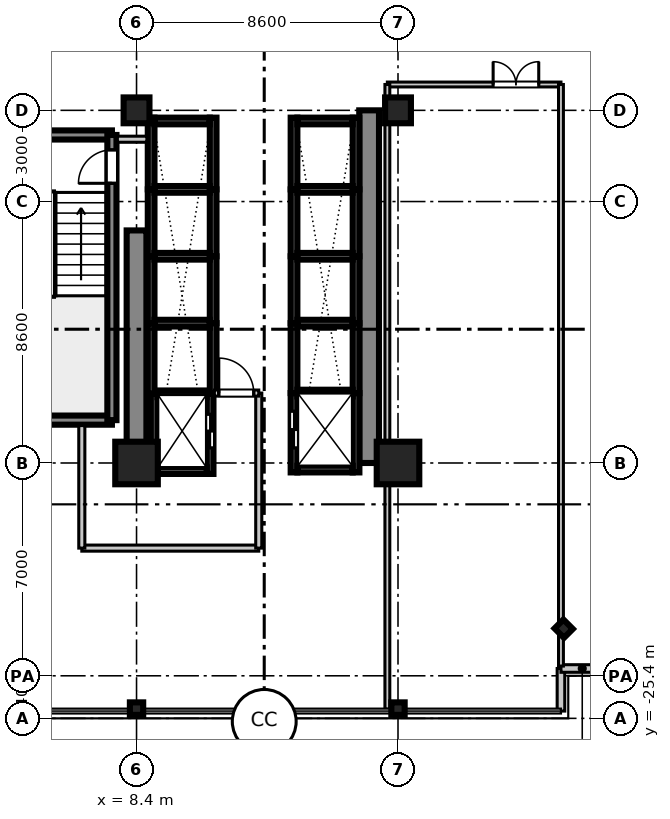
"""IFC4 building model, lengths in metres.
Left out: names, types, materials, properties, quantities, classifications, styles, units other than length and angle.
Written with IfcOpenShell. Run it as: python <this file> out.ifc"""

import sys

from ifc_helpers import new_model, si_unit, direction, frame, frame_2d, origin, origin_2d, place, context, subcontext, project, spatial, rectangle, i_section, extrude, source, transform, mapped, element, fill, save


model = new_model("IFC4")
c1 = context("Model", 3, precision=1e-05, world=origin(), true_north=direction((0.0, 1.0)))
c2 = subcontext(c1, "Body", "Model", "MODEL_VIEW")
j1 = project(units=[si_unit("LENGTHUNIT", "METRE"), si_unit("PLANEANGLEUNIT", "RADIAN")], contexts=[c1])
p1 = place(None, origin())
s1 = spatial("IfcSite", under=j1, at=p1, CompositionType="ELEMENT")
p2 = place(p1, origin())
s2 = spatial("IfcBuilding", under=s1, at=p2, CompositionType="ELEMENT")
p3 = place(p2, frame((0.0, 0.0, 47.0)))
s3 = spatial("IfcBuildingStorey", under=s2, at=p3, CompositionType="ELEMENT", Elevation=47.0)
m1 = source(origin(), c2, "Body", "SweptSolid", [
    extrude(rectangle(XDim=1.4, YDim=1.4, at=origin_2d()), origin(), (0.0, 0.0, 1.0), 3.605),
])
p4 = place(p3, frame((8.4, -17.0, 0.0), z_axis=(0.0, 0.0, 1.0), x_axis=(1.0, 0.0, 0.0)))
e1 = element("IfcColumn", 1, at=p4, inside=s3, PredefinedType="COLUMN", context=c2, shape_type="MappedRepresentation", body=[
    mapped(m1, transform((0.0, 0.0, 0.0), scale=1.0)),
])
m2 = source(origin(), c2, "Body", "SweptSolid", [
    extrude(rectangle(XDim=0.85, YDim=0.85, at=origin_2d()), origin(), (0.0, 0.0, 1.0), 3.605),
])
p5 = place(p3, frame((8.4, -5.4, 0.0), z_axis=(0.0, 0.0, 1.0), x_axis=(1.0, 0.0, 0.0)))
e2 = element("IfcColumn", 2, at=p5, inside=s3, PredefinedType="PILASTER", context=c2, shape_type="MappedRepresentation", body=[
    mapped(m2, transform((0.0, 0.0, 0.0), scale=1.0)),
])
p6 = place(p3, frame((17.0, -17.0, 0.0), z_axis=(0.0, 0.0, 1.0), x_axis=(1.0, 0.0, 0.0)))
e3 = element("IfcColumn", 3, at=p6, inside=s3, PredefinedType="COLUMN", context=c2, shape_type="MappedRepresentation", body=[
    mapped(m1, transform((0.0, 0.0, 0.0), scale=1.0)),
])
p7 = place(p3, frame((17.0, -5.4, 0.0), z_axis=(0.0, 0.0, 1.0), x_axis=(1.0, 0.0, 0.0)))
e4 = element("IfcColumn", 4, at=p7, inside=s3, PredefinedType="PILASTER", context=c2, shape_type="MappedRepresentation", body=[
    mapped(m2, transform((0.0, 0.0, 0.0), scale=1.0)),
])
m3 = source(origin(), c2, "Body", "SweptSolid", [
    extrude(i_section(OverallWidth=0.412, OverallDepth=0.438, WebThickness=0.023, FlangeThickness=0.036, at=origin_2d()), origin(), (0.0, 0.0, 1.0), 3.605),
])
for number, where, z_axis, x_axis in (
    (5, (8.4, -25.08, 0.0), (0.0, 0.0, 1.0), (0.0, 1.0, 0.0)),
    (6, (17.0, -25.08, 0.0), (0.0, 0.0, 1.0), (0.0, 1.0, 0.0)),
    (7, (22.45, -22.45, 0.0), (0.0, 0.0, 1.0), (0.707, 0.707, 0.0)),
):
    element("IfcColumn", number, at=place(p3, frame(where, z_axis=z_axis, x_axis=x_axis)), inside=s3, PredefinedType="COLUMN", context=c2, shape_type="MappedRepresentation", body=[
        mapped(m3, transform((0.0, 0.0, 0.0), scale=1.0)),
    ])
m4 = source(origin(), c2, "Body", "SweptSolid", [
    extrude(rectangle(XDim=7.65, YDim=0.65, at=frame_2d((3.825, 0.0))), origin(), (0.0, 0.0, 1.0), 3.37),
])
p8 = place(p3, frame((8.4, -17.0, 0.0), z_axis=(0.0, 0.0, 1.0), x_axis=(0.0, 1.0, 0.0)))
e8 = element("IfcWall", 8, at=p8, inside=s3, PredefinedType="SHEAR", context=c2, shape_type="MappedRepresentation", body=[
    mapped(m4, transform((0.0, 0.0, 0.0), scale=1.0)),
])
m5 = source(origin(), c2, "Body", "SweptSolid", [
    extrude(rectangle(XDim=11.6, YDim=0.65, at=frame_2d((5.8, 0.0))), origin(), (0.0, 0.0, 1.0), 3.37),
])
p9 = place(p3, frame((16.05, -17.0, 0.0), z_axis=(0.0, 0.0, 1.0), x_axis=(0.0, 1.0, 0.0)))
e9 = element("IfcWall", 9, at=p9, inside=s3, PredefinedType="SHEAR", context=c2, shape_type="MappedRepresentation", body=[
    mapped(m5, transform((0.0, 0.0, 0.0), scale=1.0)),
])
m6 = source(origin(), c2, "Body", "SweptSolid", [
    extrude(rectangle(XDim=3.98, YDim=0.3, at=frame_2d((1.99, 0.0))), origin(), (0.0, 0.0, 1.0), 3.37),
])
for number, where, z_axis, x_axis in (
    (10, (3.61, -15.59, 0.0), (0.0, 0.0, 1.0), (1.0, 0.0, 0.0)),
    (11, (3.61, -6.21, 0.0), (0.0, 0.0, 1.0), (1.0, 0.0, 0.0)),
):
    element("IfcWall", number, at=place(p3, frame(where, z_axis=z_axis, x_axis=x_axis)), inside=s3, PredefinedType="SHEAR", context=c2, shape_type="MappedRepresentation", body=[
        mapped(m6, transform((0.0, 0.0, 0.0), scale=1.0)),
    ])
m7 = source(origin(), c2, "Body", "SweptSolid", [
    extrude(rectangle(XDim=9.38, YDim=0.3, at=frame_2d((4.69, 0.0))), origin(), (0.0, 0.0, 1.0), 3.37),
])
p10 = place(p3, frame((7.59, -15.59, 0.0), z_axis=(0.0, 0.0, 1.0), x_axis=(0.0, 1.0, 0.0)))
e12 = element("IfcWall", 12, at=p10, inside=s3, PredefinedType="SHEAR", context=c2, shape_type="MappedRepresentation", body=[
    mapped(m7, transform((0.0, 0.0, 0.0), scale=1.0)),
])
p11 = place(p10, frame((7.79, 0.0, 0.0)))
e13 = element("IfcOpeningElement", 13, at=p11, cuts=e12, PredefinedType="OPENING", context=c2, shape_type="SweptSolid", body=[
    extrude(rectangle(XDim=1.1, YDim=2.15, at=frame_2d((0.55, 1.075))), frame((0.0, 0.16, 0.0), z_axis=(0.0, -1.0, 0.0), x_axis=(1.0, 0.0, 0.0)), (0.0, 0.0, 1.0), 0.32),
])
m8 = source(origin(), c2, "Body", "SweptSolid", [
    extrude(rectangle(XDim=2.36, YDim=0.22, at=frame_2d((1.18, 0.0))), origin(), (0.0, 0.0, 1.0), 3.37),
])
for number, where, z_axis, x_axis in (
    (14, (13.58, -8.0, 0.0), (0.0, 0.0, 1.0), (0.0, 1.0, 0.0)),
    (15, (15.62, -8.0, 0.0), (0.0, 0.0, 1.0), (0.0, 1.0, 0.0)),
):
    element("IfcWall", number, at=place(p3, frame(where, z_axis=z_axis, x_axis=x_axis)), inside=s3, PredefinedType="SHEAR", context=c2, shape_type="MappedRepresentation", body=[
        mapped(m8, transform((0.0, 0.0, 0.0), scale=1.0)),
    ])
m9 = source(origin(), c2, "Body", "SweptSolid", [
    extrude(rectangle(XDim=1.82, YDim=0.22, at=frame_2d((0.91, 0.0))), origin(), (0.0, 0.0, 1.0), 3.37),
])
p12 = place(p3, frame((13.69, -5.75, 0.0), z_axis=(0.0, 0.0, 1.0), x_axis=(1.0, 0.0, 0.0)))
e16 = element("IfcWall", 16, at=p12, inside=s3, PredefinedType="SHEAR", context=c2, shape_type="MappedRepresentation", body=[
    mapped(m9, transform((0.0, 0.0, 0.0), scale=1.0)),
])
m10 = source(origin(), c2, "Body", "SweptSolid", [
    extrude(rectangle(XDim=2.2, YDim=0.22, at=frame_2d((1.1, 0.0))), origin(), (0.0, 0.0, 1.0), 3.37),
])
for number, where, z_axis, x_axis in (
    (17, (13.58, -10.2, 0.0), (0.0, 0.0, 1.0), (0.0, 1.0, 0.0)),
    (18, (15.62, -10.2, 0.0), (0.0, 0.0, 1.0), (0.0, 1.0, 0.0)),
):
    element("IfcWall", number, at=place(p3, frame(where, z_axis=z_axis, x_axis=x_axis)), inside=s3, PredefinedType="SHEAR", context=c2, shape_type="MappedRepresentation", body=[
        mapped(m10, transform((0.0, 0.0, 0.0), scale=1.0)),
    ])
m11 = source(origin(), c2, "Body", "SweptSolid", [
    extrude(rectangle(XDim=1.82, YDim=0.22, at=frame_2d((0.91, 0.0))), origin(), (0.0, 0.0, 1.0), 3.65),
])
p13 = place(p3, frame((13.69, -8.0, 0.0), z_axis=(0.0, 0.0, 1.0), x_axis=(1.0, 0.0, 0.0)))
e19 = element("IfcWall", 19, at=p13, inside=s3, PredefinedType="SHEAR", context=c2, shape_type="MappedRepresentation", body=[
    mapped(m11, transform((0.0, 0.0, 0.0), scale=1.0)),
])
for number, where, z_axis, x_axis in (
    (20, (13.58, -12.4, 0.0), (0.0, 0.0, 1.0), (0.0, 1.0, 0.0)),
    (21, (15.62, -12.4, 0.0), (0.0, 0.0, 1.0), (0.0, 1.0, 0.0)),
):
    element("IfcWall", number, at=place(p3, frame(where, z_axis=z_axis, x_axis=x_axis)), inside=s3, PredefinedType="SHEAR", context=c2, shape_type="MappedRepresentation", body=[
        mapped(m10, transform((0.0, 0.0, 0.0), scale=1.0)),
    ])
p14 = place(p3, frame((13.69, -10.2, 0.0), z_axis=(0.0, 0.0, 1.0), x_axis=(1.0, 0.0, 0.0)))
e22 = element("IfcWall", 22, at=p14, inside=s3, PredefinedType="SHEAR", context=c2, shape_type="MappedRepresentation", body=[
    mapped(m11, transform((0.0, 0.0, 0.0), scale=1.0)),
])
m12 = source(origin(), c2, "Body", "SweptSolid", [
    extrude(rectangle(XDim=2.3, YDim=0.22, at=frame_2d((1.15, 0.0))), origin(), (0.0, 0.0, 1.0), 3.37),
])
for number, where, z_axis, x_axis in (
    (23, (13.58, -14.7, 0.0), (0.0, 0.0, 1.0), (0.0, 1.0, 0.0)),
    (24, (15.62, -14.7, 0.0), (0.0, 0.0, 1.0), (0.0, 1.0, 0.0)),
):
    element("IfcWall", number, at=place(p3, frame(where, z_axis=z_axis, x_axis=x_axis)), inside=s3, PredefinedType="SHEAR", context=c2, shape_type="MappedRepresentation", body=[
        mapped(m12, transform((0.0, 0.0, 0.0), scale=1.0)),
    ])
p15 = place(p3, frame((13.69, -12.4, 0.0), z_axis=(0.0, 0.0, 1.0), x_axis=(1.0, 0.0, 0.0)))
e25 = element("IfcWall", 25, at=p15, inside=s3, PredefinedType="SHEAR", context=c2, shape_type="MappedRepresentation", body=[
    mapped(m11, transform((0.0, 0.0, 0.0), scale=1.0)),
])
for number, where, z_axis, x_axis in (
    (26, (8.88, -8.0, 0.0), (0.0, 0.0, 1.0), (0.0, 1.0, 0.0)),
    (27, (10.92, -8.0, 0.0), (0.0, 0.0, 1.0), (0.0, 1.0, 0.0)),
):
    element("IfcWall", number, at=place(p3, frame(where, z_axis=z_axis, x_axis=x_axis)), inside=s3, PredefinedType="SHEAR", context=c2, shape_type="MappedRepresentation", body=[
        mapped(m8, transform((0.0, 0.0, 0.0), scale=1.0)),
    ])
p16 = place(p3, frame((8.99, -5.75, 0.0), z_axis=(0.0, 0.0, 1.0), x_axis=(1.0, 0.0, 0.0)))
e28 = element("IfcWall", 28, at=p16, inside=s3, PredefinedType="SHEAR", context=c2, shape_type="MappedRepresentation", body=[
    mapped(m9, transform((0.0, 0.0, 0.0), scale=1.0)),
])
for number, where, z_axis, x_axis in (
    (29, (8.88, -10.2, 0.0), (0.0, 0.0, 1.0), (0.0, 1.0, 0.0)),
    (30, (10.92, -10.2, 0.0), (0.0, 0.0, 1.0), (0.0, 1.0, 0.0)),
):
    element("IfcWall", number, at=place(p3, frame(where, z_axis=z_axis, x_axis=x_axis)), inside=s3, PredefinedType="SHEAR", context=c2, shape_type="MappedRepresentation", body=[
        mapped(m10, transform((0.0, 0.0, 0.0), scale=1.0)),
    ])
p17 = place(p3, frame((8.99, -8.0, 0.0), z_axis=(0.0, 0.0, 1.0), x_axis=(1.0, 0.0, 0.0)))
e31 = element("IfcWall", 31, at=p17, inside=s3, PredefinedType="SHEAR", context=c2, shape_type="MappedRepresentation", body=[
    mapped(m11, transform((0.0, 0.0, 0.0), scale=1.0)),
])
for number, where, z_axis, x_axis in (
    (32, (8.88, -12.4, 0.0), (0.0, 0.0, 1.0), (0.0, 1.0, 0.0)),
    (33, (10.92, -12.4, 0.0), (0.0, 0.0, 1.0), (0.0, 1.0, 0.0)),
):
    element("IfcWall", number, at=place(p3, frame(where, z_axis=z_axis, x_axis=x_axis)), inside=s3, PredefinedType="SHEAR", context=c2, shape_type="MappedRepresentation", body=[
        mapped(m10, transform((0.0, 0.0, 0.0), scale=1.0)),
    ])
p18 = place(p3, frame((8.99, -10.2, 0.0), z_axis=(0.0, 0.0, 1.0), x_axis=(1.0, 0.0, 0.0)))
e34 = element("IfcWall", 34, at=p18, inside=s3, PredefinedType="SHEAR", context=c2, shape_type="MappedRepresentation", body=[
    mapped(m11, transform((0.0, 0.0, 0.0), scale=1.0)),
])
m13 = source(origin(), c2, "Body", "SweptSolid", [
    extrude(rectangle(XDim=2.325, YDim=0.22, at=frame_2d((1.163, 0.0))), origin(), (0.0, 0.0, 1.0), 3.37),
])
for number, where, z_axis, x_axis in (
    (35, (8.88, -14.725, 0.0), (0.0, 0.0, 1.0), (0.0, 1.0, 0.0)),
    (36, (10.92, -14.725, 0.0), (0.0, 0.0, 1.0), (0.0, 1.0, 0.0)),
):
    element("IfcWall", number, at=place(p3, frame(where, z_axis=z_axis, x_axis=x_axis)), inside=s3, PredefinedType="SHEAR", context=c2, shape_type="MappedRepresentation", body=[
        mapped(m13, transform((0.0, 0.0, 0.0), scale=1.0)),
    ])
p19 = place(p3, frame((8.99, -12.4, 0.0), z_axis=(0.0, 0.0, 1.0), x_axis=(1.0, 0.0, 0.0)))
e37 = element("IfcWall", 37, at=p19, inside=s3, PredefinedType="SHEAR", context=c2, shape_type="MappedRepresentation", body=[
    mapped(m11, transform((0.0, 0.0, 0.0), scale=1.0)),
])
m14 = source(origin(), c2, "Body", "SweptSolid", [
    extrude(rectangle(XDim=2.635, YDim=0.22, at=frame_2d((1.317, 0.0))), origin(), (0.0, 0.0, 1.0), 3.37),
])
p20 = place(p3, frame((8.98, -17.36, 0.0), z_axis=(0.0, 0.0, 1.0), x_axis=(0.0, 1.0, 0.0)))
e38 = element("IfcWall", 38, at=p20, inside=s3, PredefinedType="SHEAR", context=c2, shape_type="MappedRepresentation", body=[
    mapped(m14, transform((0.0, 0.0, 0.0), scale=1.0)),
])
p21 = place(p3, frame((10.82, -17.36, 0.0), z_axis=(0.0, 0.0, 1.0), x_axis=(0.0, 1.0, 0.0)))
e39 = element("IfcWall", 39, at=p21, inside=s3, PredefinedType="SHEAR", context=c2, shape_type="MappedRepresentation", body=[
    mapped(m14, transform((0.0, 0.0, 0.0), scale=1.0)),
])
p22 = place(p21, frame((0.86, 0.0, 0.0)))
e40 = element("IfcOpeningElement", 40, at=p22, cuts=e39, PredefinedType="OPENING", context=c2, shape_type="SweptSolid", body=[
    extrude(rectangle(XDim=1.1, YDim=2.2, at=frame_2d((0.55, 1.1))), frame((0.0, 0.12, 0.0), z_axis=(0.0, -1.0, 0.0), x_axis=(1.0, 0.0, 0.0)), (0.0, 0.0, 1.0), 0.24),
])
m15 = source(origin(), c2, "Body", "SweptSolid", [
    extrude(rectangle(XDim=1.62, YDim=0.22, at=frame_2d((0.81, 0.0))), origin(), (0.0, 0.0, 1.0), 3.37),
])
p23 = place(p3, frame((9.09, -17.25, 0.0), z_axis=(0.0, 0.0, 1.0), x_axis=(1.0, 0.0, 0.0)))
e41 = element("IfcWall", 41, at=p23, inside=s3, PredefinedType="SHEAR", context=c2, shape_type="MappedRepresentation", body=[
    mapped(m15, transform((0.0, 0.0, 0.0), scale=1.0)),
])
m16 = source(origin(), c2, "Body", "SweptSolid", [
    extrude(rectangle(XDim=1.62, YDim=0.22, at=frame_2d((0.81, 0.0))), origin(), (0.0, 0.0, 1.0), 3.65),
])
p24 = place(p3, frame((9.09, -14.725, 0.0), z_axis=(0.0, 0.0, 1.0), x_axis=(1.0, 0.0, 0.0)))
e42 = element("IfcWall", 42, at=p24, inside=s3, PredefinedType="SHEAR", context=c2, shape_type="MappedRepresentation", body=[
    mapped(m16, transform((0.0, 0.0, 0.0), scale=1.0)),
])
m17 = source(origin(), c2, "Body", "SweptSolid", [
    extrude(rectangle(XDim=2.61, YDim=0.22, at=frame_2d((1.305, 0.0))), origin(), (0.0, 0.0, 1.0), 3.37),
])
p25 = place(p3, frame((13.58, -17.31, 0.0), z_axis=(0.0, 0.0, 1.0), x_axis=(0.0, 1.0, 0.0)))
e43 = element("IfcWall", 43, at=p25, inside=s3, PredefinedType="SHEAR", context=c2, shape_type="MappedRepresentation", body=[
    mapped(m17, transform((0.0, 0.0, 0.0), scale=1.0)),
])
p26 = place(p25, frame((0.81, 0.0, 0.0)))
e44 = element("IfcOpeningElement", 44, at=p26, cuts=e43, PredefinedType="OPENING", context=c2, shape_type="SweptSolid", body=[
    extrude(rectangle(XDim=1.2, YDim=2.2, at=frame_2d((0.6, 1.1))), frame((0.0, 0.12, 0.0), z_axis=(0.0, -1.0, 0.0), x_axis=(1.0, 0.0, 0.0)), (0.0, 0.0, 1.0), 0.24),
])
p27 = place(p3, frame((15.62, -17.31, 0.0), z_axis=(0.0, 0.0, 1.0), x_axis=(0.0, 1.0, 0.0)))
e45 = element("IfcWall", 45, at=p27, inside=s3, PredefinedType="SHEAR", context=c2, shape_type="MappedRepresentation", body=[
    mapped(m17, transform((0.0, 0.0, 0.0), scale=1.0)),
])
p28 = place(p3, frame((13.69, -17.2, 0.0), z_axis=(0.0, 0.0, 1.0), x_axis=(1.0, 0.0, 0.0)))
e46 = element("IfcWall", 46, at=p28, inside=s3, PredefinedType="SHEAR", context=c2, shape_type="MappedRepresentation", body=[
    mapped(m9, transform((0.0, 0.0, 0.0), scale=1.0)),
])
p29 = place(p3, frame((13.69, -14.7, 0.0), z_axis=(0.0, 0.0, 1.0), x_axis=(1.0, 0.0, 0.0)))
e47 = element("IfcWall", 47, at=p29, inside=s3, PredefinedType="SHEAR", context=c2, shape_type="MappedRepresentation", body=[
    mapped(m11, transform((0.0, 0.0, 0.0), scale=1.0)),
])
m18 = source(origin(), c2, "Body", "SweptSolid", [
    extrude(rectangle(XDim=1.4, YDim=0.25, at=frame_2d((0.7, 0.0))), origin(), (0.0, 0.0, 1.0), 3.37),
])
for number, where, z_axis, x_axis in (
    (48, (22.36, -25.16, 0.0), (0.0, 0.0, 1.0), (0.0, 1.0, 0.0)),
    (49, (22.36, -23.76, 0.0), (0.0, 0.0, 1.0), (1.0, 0.0, 0.0)),
):
    element("IfcWall", number, at=place(p3, frame(where, z_axis=z_axis, x_axis=x_axis)), inside=s3, PredefinedType="STANDARD", context=c2, shape_type="MappedRepresentation", body=[
        mapped(m18, transform((0.0, 0.0, 0.0), scale=1.0)),
    ])
m19 = source(origin(), c2, "Body", "SweptSolid", [
    extrude(rectangle(XDim=5.82, YDim=0.2, at=frame_2d((2.91, 0.0))), origin(), (0.0, 0.0, 1.0), 2.71),
])
p30 = place(p3, frame((6.6, -19.8, 0.0), z_axis=(0.0, 0.0, 1.0), x_axis=(1.0, 0.0, 0.0)))
e50 = element("IfcWall", 50, at=p30, inside=s3, PredefinedType="PARTITIONING", context=c2, shape_type="MappedRepresentation", body=[
    mapped(m19, transform((0.0, 0.0, 0.0), scale=1.0)),
])
m20 = source(origin(), c2, "Body", "SweptSolid", [
    extrude(rectangle(XDim=4.03, YDim=0.2, at=frame_2d((2.015, 0.0))), origin(), (0.0, 0.0, 1.0), 2.71),
])
p31 = place(p3, frame((6.6, -19.8, 0.0), z_axis=(0.0, 0.0, 1.0), x_axis=(0.0, 1.0, 0.0)))
e51 = element("IfcWall", 51, at=p31, inside=s3, PredefinedType="PARTITIONING", context=c2, shape_type="MappedRepresentation", body=[
    mapped(m20, transform((0.0, 0.0, 0.0), scale=1.0)),
])
m21 = source(origin(), c2, "Body", "SweptSolid", [
    extrude(rectangle(XDim=5.1, YDim=0.2, at=frame_2d((2.55, 0.0))), origin(), (0.0, 0.0, 1.0), 2.71),
])
p32 = place(p3, frame((12.42, -19.8, 0.0), z_axis=(0.0, 0.0, 1.0), x_axis=(0.0, 1.0, 0.0)))
e52 = element("IfcWall", 52, at=p32, inside=s3, PredefinedType="PARTITIONING", context=c2, shape_type="MappedRepresentation", body=[
    mapped(m21, transform((0.0, 0.0, 0.0), scale=1.0)),
])
m22 = source(origin(), c2, "Body", "SweptSolid", [
    extrude(rectangle(XDim=1.46, YDim=0.2, at=frame_2d((0.73, 0.0))), origin(), (0.0, 0.0, 1.0), 2.71),
])
p33 = place(p3, frame((10.96, -14.7, 0.0), z_axis=(0.0, 0.0, 1.0), x_axis=(1.0, 0.0, 0.0)))
e53 = element("IfcWall", 53, at=p33, inside=s3, PredefinedType="PARTITIONING", context=c2, shape_type="MappedRepresentation", body=[
    mapped(m22, transform((0.0, 0.0, 0.0), scale=1.0)),
])
p34 = place(p33, frame((0.145, 0.0, 0.0)))
e54 = element("IfcOpeningElement", 54, at=p34, cuts=e53, PredefinedType="OPENING", context=c2, shape_type="SweptSolid", body=[
    extrude(rectangle(XDim=1.15, YDim=2.15, at=frame_2d((0.575, 1.075))), frame((0.0, 0.11, 0.0), z_axis=(0.0, -1.0, 0.0), x_axis=(1.0, 0.0, 0.0)), (0.0, 0.0, 1.0), 0.22),
])
m23 = source(origin(), c2, "Body", "SweptSolid", [
    extrude(rectangle(XDim=0.97, YDim=0.2, at=frame_2d((0.485, 0.0))), origin(), (0.0, 0.0, 1.0), 2.71),
])
p35 = place(p3, frame((7.77, -6.35, 0.0), z_axis=(0.0, 0.0, 1.0), x_axis=(1.0, 0.0, 0.0)))
e55 = element("IfcWall", 55, at=p35, inside=s3, PredefinedType="PARTITIONING", context=c2, shape_type="MappedRepresentation", body=[
    mapped(m23, transform((0.0, 0.0, 0.0), scale=1.0)),
])
m24 = source(origin(), c2, "Body", "SweptSolid", [
    extrude(rectangle(XDim=5.71, YDim=0.16, at=frame_2d((2.855, 0.0))), origin(), (0.0, 0.0, 1.0), 2.71),
])
p36 = place(p3, frame((16.65, -4.55, 0.0), z_axis=(0.0, 0.0, 1.0), x_axis=(1.0, 0.0, 0.0)))
e56 = element("IfcWall", 56, at=p36, inside=s3, PredefinedType="PARTITIONING", context=c2, shape_type="MappedRepresentation", body=[
    mapped(m24, transform((0.0, 0.0, 0.0), scale=1.0)),
])
p37 = place(p36, frame((3.479, 0.0, 0.0)))
e57 = element("IfcOpeningElement", 57, at=p37, cuts=e56, PredefinedType="OPENING", context=c2, shape_type="SweptSolid", body=[
    extrude(rectangle(XDim=1.5, YDim=2.15, at=frame_2d((0.75, 1.075))), frame((0.0, 0.09, 0.0), z_axis=(0.0, -1.0, 0.0), x_axis=(1.0, 0.0, 0.0)), (0.0, 0.0, 1.0), 0.18),
])
m25 = source(origin(), c2, "Body", "SweptSolid", [
    extrude(rectangle(XDim=20.55, YDim=0.16, at=frame_2d((10.275, 0.0))), origin(), (0.0, 0.0, 1.0), 2.71),
])
p38 = place(p3, frame((16.65, -25.1, 0.0), z_axis=(0.0, 0.0, 1.0), x_axis=(0.0, 1.0, 0.0)))
e58 = element("IfcWall", 58, at=p38, inside=s3, PredefinedType="PARTITIONING", context=c2, shape_type="MappedRepresentation", body=[
    mapped(m25, transform((0.0, 0.0, 0.0), scale=1.0)),
])
m26 = source(origin(), c2, "Body", "SweptSolid", [
    extrude(rectangle(XDim=19.13, YDim=0.16, at=frame_2d((9.565, 0.0))), origin(), (0.0, 0.0, 1.0), 2.71),
])
p39 = place(p3, frame((22.36, -23.68, 0.0), z_axis=(0.0, 0.0, 1.0), x_axis=(0.0, 1.0, 0.0)))
e59 = element("IfcWall", 59, at=p39, inside=s3, PredefinedType="PARTITIONING", context=c2, shape_type="MappedRepresentation", body=[
    mapped(m26, transform((0.0, 0.0, 0.0), scale=1.0)),
])
m27 = source(origin(), c2, "Body", "SweptSolid", [
    extrude(rectangle(XDim=1.1, YDim=2.15, at=frame_2d((0.55, 1.075))), frame((0.0, 0.025, 0.0), z_axis=(0.0, -1.0, 0.0), x_axis=(1.0, 0.0, 0.0)), (0.0, 0.0, 1.0), 0.05),
])
p40 = place(p11, origin())
e60 = element("IfcDoor", 60, at=p40, inside=s3, OperationType="SINGLE_SWING_LEFT", PredefinedType="DOOR", context=c2, shape_type="MappedRepresentation", body=[
    mapped(m27, transform((0.0, 0.0, 0.0), scale=1.0)),
])
fill(e13, e60)
m28 = source(origin(), c2, "Body", "SweptSolid", [
    extrude(rectangle(XDim=1.1, YDim=2.2, at=frame_2d((0.55, 1.1))), frame((0.0, 0.025, 0.0), z_axis=(0.0, -1.0, 0.0), x_axis=(1.0, 0.0, 0.0)), (0.0, 0.0, 1.0), 0.05),
])
p41 = place(p22, frame((1.1, 0.0, 0.0), z_axis=(0.0, 0.0, 1.0), x_axis=(-1.0, 0.0, 0.0)))
e61 = element("IfcDoor", 61, at=p41, inside=s3, OperationType="DOUBLE_DOOR_SLIDING", PredefinedType="DOOR", context=c2, shape_type="MappedRepresentation", body=[
    mapped(m28, transform((0.0, 0.0, 0.0), scale=1.0)),
])
fill(e40, e61)
m29 = source(origin(), c2, "Body", "SweptSolid", [
    extrude(rectangle(XDim=1.2, YDim=2.2, at=frame_2d((0.6, 1.1))), frame((0.0, 0.025, 0.0), z_axis=(0.0, -1.0, 0.0), x_axis=(1.0, 0.0, 0.0)), (0.0, 0.0, 1.0), 0.05),
])
p42 = place(p26, origin())
e62 = element("IfcDoor", 62, at=p42, inside=s3, OperationType="DOUBLE_DOOR_SLIDING", PredefinedType="DOOR", context=c2, shape_type="MappedRepresentation", body=[
    mapped(m29, transform((0.0, 0.0, 0.0), scale=1.0)),
])
fill(e44, e62)
m30 = source(origin(), c2, "Body", "SweptSolid", [
    extrude(rectangle(XDim=1.15, YDim=2.15, at=frame_2d((0.575, 1.075))), frame((0.0, 0.025, 0.0), z_axis=(0.0, -1.0, 0.0), x_axis=(1.0, 0.0, 0.0)), (0.0, 0.0, 1.0), 0.05),
])
p43 = place(p34, origin())
e63 = element("IfcDoor", 63, at=p43, inside=s3, OperationType="SINGLE_SWING_LEFT", PredefinedType="DOOR", context=c2, shape_type="MappedRepresentation", body=[
    mapped(m30, transform((0.0, 0.0, 0.0), scale=1.0)),
])
fill(e54, e63)
m31 = source(origin(), c2, "Body", "SweptSolid", [
    extrude(rectangle(XDim=1.5, YDim=2.15, at=frame_2d((0.75, 1.075))), frame((0.0, 0.025, 0.0), z_axis=(0.0, -1.0, 0.0), x_axis=(1.0, 0.0, 0.0)), (0.0, 0.0, 1.0), 0.05),
])
p44 = place(p37, frame((1.5, 0.0, 0.0), z_axis=(0.0, 0.0, 1.0), x_axis=(-1.0, 0.0, 0.0)))
e64 = element("IfcDoor", 64, at=p44, inside=s3, OperationType="DOUBLE_DOOR_SINGLE_SWING", PredefinedType="DOOR", context=c2, shape_type="MappedRepresentation", body=[
    mapped(m31, transform((0.0, 0.0, 0.0), scale=1.0)),
])
fill(e57, e64)
save(model, sys.argv[1])
